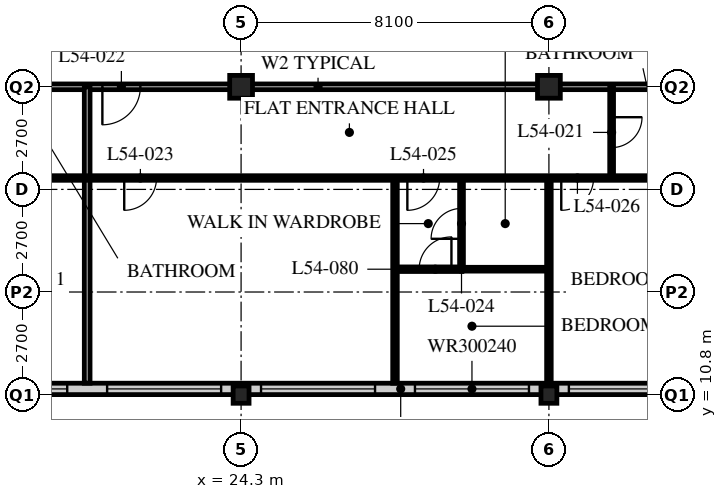
"""IFC4 building model, lengths in metres.
Left out: names, types, materials, properties, quantities, classifications, styles, units other than length and angle.
Written with IfcOpenShell. Run it as: python <this file> out.ifc"""

import sys

from ifc_helpers import new_model, si_unit, direction, frame, frame_2d, origin, origin_2d, place, context, subcontext, project, spatial, rectangle, hollow_rectangle, i_section, extrude, element, fill, save


model = new_model("IFC4")
c1 = context("Model", 3, precision=1e-05, world=origin(), true_north=direction((0.0, 1.0)))
c2 = subcontext(c1, "Body", "Model", "MODEL_VIEW")
j1 = project(units=[si_unit("LENGTHUNIT", "METRE"), si_unit("PLANEANGLEUNIT", "RADIAN")], contexts=[c1])
p1 = place(None, origin())
s1 = spatial("IfcSite", under=j1, at=p1, CompositionType="ELEMENT")
p2 = place(p1, origin())
s2 = spatial("IfcBuilding", under=s1, at=p2, CompositionType="ELEMENT")
p3 = place(p2, frame((0.0, 0.0, 210.0)))
s3 = spatial("IfcBuildingStorey", under=s2, at=p3, CompositionType="ELEMENT", Elevation=210.0)
p4 = place(p3, frame((24.3, 10.8, 0.0), z_axis=(0.0, 0.0, 1.0), x_axis=(1.0, 0.0, 0.0)))
e1 = element("IfcColumn", 1, at=p4, inside=s3, PredefinedType="COLUMN", context=c2, shape_type="SweptSolid", body=[
    extrude(i_section(OverallWidth=0.418, OverallDepth=0.456, WebThickness=0.042, FlangeThickness=0.067, FilletRadius=0.015, at=origin_2d()), origin(), (0.0, 0.0, 1.0), 3.6),
])
p5 = place(p3, frame((24.3, 18.9, 0.0), z_axis=(0.0, 0.0, 1.0), x_axis=(1.0, 0.0, 0.0)))
e2 = element("IfcColumn", 2, at=p5, inside=s3, PredefinedType="COLUMN", context=c2, shape_type="SweptSolid", body=[
    extrude(hollow_rectangle(XDim=0.6, YDim=0.6, WallThickness=0.05, at=origin_2d()), origin(), (0.0, 0.0, 1.0), 3.6),
])
p6 = place(p3, frame((32.4, 10.8, 0.0), z_axis=(0.0, 0.0, 1.0), x_axis=(1.0, 0.0, 0.0)))
e3 = element("IfcColumn", 3, at=p6, inside=s3, PredefinedType="COLUMN", context=c2, shape_type="SweptSolid", body=[
    extrude(i_section(OverallWidth=0.418, OverallDepth=0.456, WebThickness=0.042, FlangeThickness=0.067, FilletRadius=0.015, at=origin_2d()), origin(), (0.0, 0.0, 1.0), 3.6),
])
p7 = place(p3, frame((32.4, 18.9, 0.0), z_axis=(0.0, 0.0, 1.0), x_axis=(1.0, 0.0, 0.0)))
e4 = element("IfcColumn", 4, at=p7, inside=s3, PredefinedType="COLUMN", context=c2, shape_type="SweptSolid", body=[
    extrude(hollow_rectangle(XDim=0.6, YDim=0.6, WallThickness=0.05, at=origin_2d()), origin(), (0.0, 0.0, 1.0), 3.6),
])
p8 = place(p3, frame((8.4, 10.95, 0.0), z_axis=(0.0, 0.0, 1.0), x_axis=(1.0, 0.0, 0.0)))
e5 = element("IfcWall", 5, at=p8, inside=s3, PredefinedType="SOLIDWALL", context=c2, shape_type="SweptSolid", body=[
    extrude(rectangle(XDim=40.2, YDim=0.3, at=frame_2d((20.1, 0.0))), origin(), (0.0, 0.0, 1.0), 3.39),
])
p9 = place(p8, frame((0.225, 0.0, 0.6)))
e6 = element("IfcOpeningElement", 6, at=p9, cuts=e5, PredefinedType="OPENING", context=c2, shape_type="SweptSolid", body=[
    extrude(rectangle(XDim=3.0, YDim=2.4, at=frame_2d((1.5, 1.2))), frame((0.0, 0.16, 0.0), z_axis=(0.0, -1.0, 0.0), x_axis=(1.0, 0.0, 0.0)), (0.0, 0.0, 1.0), 0.32),
])
p10 = place(p8, frame((4.275, 0.0, 0.6)))
e7 = element("IfcOpeningElement", 7, at=p10, cuts=e5, PredefinedType="OPENING", context=c2, shape_type="SweptSolid", body=[
    extrude(rectangle(XDim=3.0, YDim=2.4, at=frame_2d((1.5, 1.2))), frame((0.0, 0.16, 0.0), z_axis=(0.0, -1.0, 0.0), x_axis=(1.0, 0.0, 0.0)), (0.0, 0.0, 1.0), 0.32),
])
p11 = place(p8, frame((8.325, 0.0, 0.6)))
e8 = element("IfcOpeningElement", 8, at=p11, cuts=e5, PredefinedType="OPENING", context=c2, shape_type="SweptSolid", body=[
    extrude(rectangle(XDim=3.0, YDim=2.4, at=frame_2d((1.5, 1.2))), frame((0.0, 0.16, 0.0), z_axis=(0.0, -1.0, 0.0), x_axis=(1.0, 0.0, 0.0)), (0.0, 0.0, 1.0), 0.32),
])
p12 = place(p8, frame((12.375, 0.0, 0.6)))
e9 = element("IfcOpeningElement", 9, at=p12, cuts=e5, PredefinedType="OPENING", context=c2, shape_type="SweptSolid", body=[
    extrude(rectangle(XDim=3.0, YDim=2.4, at=frame_2d((1.5, 1.2))), frame((0.0, 0.16, 0.0), z_axis=(0.0, -1.0, 0.0), x_axis=(1.0, 0.0, 0.0)), (0.0, 0.0, 1.0), 0.32),
])
p13 = place(p8, frame((16.425, 0.0, 0.6)))
e10 = element("IfcOpeningElement", 10, at=p13, cuts=e5, PredefinedType="OPENING", context=c2, shape_type="SweptSolid", body=[
    extrude(rectangle(XDim=3.0, YDim=2.4, at=frame_2d((1.5, 1.2))), frame((0.0, 0.16, 0.0), z_axis=(0.0, -1.0, 0.0), x_axis=(1.0, 0.0, 0.0)), (0.0, 0.0, 1.0), 0.32),
])
p14 = place(p8, frame((20.475, 0.0, 0.6)))
e11 = element("IfcOpeningElement", 11, at=p14, cuts=e5, PredefinedType="OPENING", context=c2, shape_type="SweptSolid", body=[
    extrude(rectangle(XDim=3.0, YDim=2.4, at=frame_2d((1.5, 1.2))), frame((0.0, 0.16, 0.0), z_axis=(0.0, -1.0, 0.0), x_axis=(1.0, 0.0, 0.0)), (0.0, 0.0, 1.0), 0.32),
])
p15 = place(p8, frame((24.525, 0.0, 0.6)))
e12 = element("IfcOpeningElement", 12, at=p15, cuts=e5, PredefinedType="OPENING", context=c2, shape_type="SweptSolid", body=[
    extrude(rectangle(XDim=3.0, YDim=2.4, at=frame_2d((1.5, 1.2))), frame((0.0, 0.16, 0.0), z_axis=(0.0, -1.0, 0.0), x_axis=(1.0, 0.0, 0.0)), (0.0, 0.0, 1.0), 0.32),
])
p16 = place(p8, frame((28.575, 0.0, 0.6)))
e13 = element("IfcOpeningElement", 13, at=p16, cuts=e5, PredefinedType="OPENING", context=c2, shape_type="SweptSolid", body=[
    extrude(rectangle(XDim=3.0, YDim=2.4, at=frame_2d((1.5, 1.2))), frame((0.0, 0.16, 0.0), z_axis=(0.0, -1.0, 0.0), x_axis=(1.0, 0.0, 0.0)), (0.0, 0.0, 1.0), 0.32),
])
p17 = place(p8, frame((32.625, 0.0, 0.6)))
e14 = element("IfcOpeningElement", 14, at=p17, cuts=e5, PredefinedType="OPENING", context=c2, shape_type="SweptSolid", body=[
    extrude(rectangle(XDim=3.0, YDim=2.4, at=frame_2d((1.5, 1.2))), frame((0.0, 0.16, 0.0), z_axis=(0.0, -1.0, 0.0), x_axis=(1.0, 0.0, 0.0)), (0.0, 0.0, 1.0), 0.32),
])
p18 = place(p8, frame((36.675, 0.0, 0.6)))
e15 = element("IfcOpeningElement", 15, at=p18, cuts=e5, PredefinedType="OPENING", context=c2, shape_type="SweptSolid", body=[
    extrude(rectangle(XDim=3.0, YDim=2.4, at=frame_2d((1.5, 1.2))), frame((0.0, 0.16, 0.0), z_axis=(0.0, -1.0, 0.0), x_axis=(1.0, 0.0, 0.0)), (0.0, 0.0, 1.0), 0.32),
])
p19 = place(p3, frame((8.1, 18.9, 0.0), z_axis=(0.0, 0.0, 1.0), x_axis=(1.0, 0.0, 0.0)))
e16 = element("IfcWall", 16, at=p19, inside=s3, PredefinedType="PARTITIONING", context=c2, shape_type="SweptSolid", body=[
    extrude(rectangle(XDim=36.45, YDim=0.15, at=frame_2d((18.225, 0.0))), origin(), (0.0, 0.0, 1.0), 2.778),
])
p20 = place(p19, frame((4.45, 0.0, 0.0)))
e17 = element("IfcOpeningElement", 17, at=p20, cuts=e16, PredefinedType="OPENING", context=c2, shape_type="SweptSolid", body=[
    extrude(rectangle(XDim=1.0, YDim=2.1, at=frame_2d((0.5, 1.05))), frame((0.0, 0.085, 0.0), z_axis=(0.0, -1.0, 0.0), x_axis=(1.0, 0.0, 0.0)), (0.0, 0.0, 1.0), 0.17),
])
p21 = place(p19, frame((12.55, 0.0, 0.0)))
e18 = element("IfcOpeningElement", 18, at=p21, cuts=e16, PredefinedType="OPENING", context=c2, shape_type="SweptSolid", body=[
    extrude(rectangle(XDim=1.0, YDim=2.1, at=frame_2d((0.5, 1.05))), frame((0.0, 0.085, 0.0), z_axis=(0.0, -1.0, 0.0), x_axis=(1.0, 0.0, 0.0)), (0.0, 0.0, 1.0), 0.17),
])
p22 = place(p19, frame((29.05, 0.0, 0.0)))
e19 = element("IfcOpeningElement", 19, at=p22, cuts=e16, PredefinedType="OPENING", context=c2, shape_type="SweptSolid", body=[
    extrude(rectangle(XDim=1.0, YDim=2.1, at=frame_2d((0.5, 1.05))), frame((0.0, 0.085, 0.0), z_axis=(0.0, -1.0, 0.0), x_axis=(1.0, 0.0, 0.0)), (0.0, 0.0, 1.0), 0.17),
])
p23 = place(p19, frame((2.625, 0.0, 0.0)))
e20 = element("IfcOpeningElement", 20, at=p23, cuts=e16, PredefinedType="OPENING", context=c2, shape_type="SweptSolid", body=[
    extrude(rectangle(XDim=1.0, YDim=2.1, at=frame_2d((0.5, 1.05))), frame((0.0, 0.085, 0.0), z_axis=(0.0, -1.0, 0.0), x_axis=(1.0, 0.0, 0.0)), (0.0, 0.0, 1.0), 0.17),
])
p24 = place(p19, frame((33.925, 0.0, 0.0)))
e21 = element("IfcOpeningElement", 21, at=p24, cuts=e16, PredefinedType="OPENING", context=c2, shape_type="SweptSolid", body=[
    extrude(rectangle(XDim=1.0, YDim=2.1, at=frame_2d((0.5, 1.05))), frame((0.0, 0.085, 0.0), z_axis=(0.0, -1.0, 0.0), x_axis=(1.0, 0.0, 0.0)), (0.0, 0.0, 1.0), 0.17),
])
p25 = place(p3, frame((20.25, 18.9, 0.0), z_axis=(0.0, 0.0, 1.0), x_axis=(0.0, -1.0, 0.0)))
e22 = element("IfcWall", 22, at=p25, inside=s3, PredefinedType="PARTITIONING", context=c2, shape_type="SweptSolid", body=[
    extrude(rectangle(XDim=7.8, YDim=0.15, at=frame_2d((3.9, 0.0))), origin(), (0.0, 0.0, 1.0), 3.39),
])
p26 = place(p3, frame((34.05, 18.9, 0.0), z_axis=(0.0, 0.0, 1.0), x_axis=(0.0, -1.0, 0.0)))
e23 = element("IfcWall", 23, at=p26, inside=s3, PredefinedType="PARTITIONING", context=c2, shape_type="SweptSolid", body=[
    extrude(rectangle(XDim=2.4, YDim=0.1, at=frame_2d((1.2, 0.0))), origin(), (0.0, 0.0, 1.0), 3.39),
])
p27 = place(p26, frame((0.8, 0.0, 0.0)))
e24 = element("IfcOpeningElement", 24, at=p27, cuts=e23, PredefinedType="OPENING", context=c2, shape_type="SweptSolid", body=[
    extrude(rectangle(XDim=0.8, YDim=2.1, at=frame_2d((0.4, 1.05))), frame((0.0, 0.06, 0.0), z_axis=(0.0, -1.0, 0.0), x_axis=(1.0, 0.0, 0.0)), (0.0, 0.0, 1.0), 0.12),
])
p28 = place(p3, frame((30.1, 16.5, 0.0), z_axis=(0.0, 0.0, 1.0), x_axis=(0.0, -1.0, 0.0)))
e25 = element("IfcWall", 25, at=p28, inside=s3, PredefinedType="PARTITIONING", context=c2, shape_type="SweptSolid", body=[
    extrude(rectangle(XDim=2.4, YDim=0.1, at=frame_2d((1.2, 0.0))), origin(), (0.0, 0.0, 1.0), 3.39),
])
p29 = place(p28, frame((0.8, 0.0, 0.0)))
e26 = element("IfcOpeningElement", 26, at=p29, cuts=e25, PredefinedType="OPENING", context=c2, shape_type="SweptSolid", body=[
    extrude(rectangle(XDim=0.8, YDim=2.1, at=frame_2d((0.4, 1.05))), frame((0.0, 0.06, 0.0), z_axis=(0.0, -1.0, 0.0), x_axis=(1.0, 0.0, 0.0)), (0.0, 0.0, 1.0), 0.12),
])
p30 = place(p3, frame((30.1, 14.1, 0.0), z_axis=(0.0, 0.0, 1.0), x_axis=(1.0, 0.0, 0.0)))
e27 = element("IfcWall", 27, at=p30, inside=s3, PredefinedType="PARTITIONING", context=c2, shape_type="SweptSolid", body=[
    extrude(rectangle(XDim=2.3, YDim=0.1, at=frame_2d((1.15, 0.0))), origin(), (0.0, 0.0, 1.0), 3.39),
])
p31 = place(p3, frame((28.35, 16.5, 0.0), z_axis=(0.0, 0.0, 1.0), x_axis=(0.0, -1.0, 0.0)))
e28 = element("IfcWall", 28, at=p31, inside=s3, PredefinedType="PARTITIONING", context=c2, shape_type="SweptSolid", body=[
    extrude(rectangle(XDim=5.4, YDim=0.12, at=frame_2d((2.7, 0.0))), origin(), (0.0, 0.0, 1.0), 3.39),
])
p32 = place(p3, frame((32.4, 16.5, 0.0), z_axis=(0.0, 0.0, 1.0), x_axis=(0.0, -1.0, 0.0)))
e29 = element("IfcWall", 29, at=p32, inside=s3, PredefinedType="PARTITIONING", context=c2, shape_type="SweptSolid", body=[
    extrude(rectangle(XDim=5.4, YDim=0.12, at=frame_2d((2.7, 0.0))), origin(), (0.0, 0.0, 1.0), 2.778),
])
p33 = place(p3, frame((8.1, 16.5, 0.0), z_axis=(0.0, 0.0, 1.0), x_axis=(1.0, 0.0, 0.0)))
e30 = element("IfcWall", 30, at=p33, inside=s3, PredefinedType="PARTITIONING", context=c2, shape_type="SweptSolid", body=[
    extrude(rectangle(XDim=28.35, YDim=0.12, at=frame_2d((14.175, 0.0))), origin(), (0.0, 0.0, 1.0), 3.39),
])
p34 = place(p33, frame((5.025, 0.0, 0.0)))
e31 = element("IfcOpeningElement", 31, at=p34, cuts=e30, PredefinedType="OPENING", context=c2, shape_type="SweptSolid", body=[
    extrude(rectangle(XDim=0.85, YDim=2.1, at=frame_2d((0.425, 1.05))), frame((0.0, 0.07, 0.0), z_axis=(0.0, -1.0, 0.0), x_axis=(1.0, 0.0, 0.0)), (0.0, 0.0, 1.0), 0.14),
])
p35 = place(p33, frame((8.425, 0.0, 0.0)))
e32 = element("IfcOpeningElement", 32, at=p35, cuts=e30, PredefinedType="OPENING", context=c2, shape_type="SweptSolid", body=[
    extrude(rectangle(XDim=0.85, YDim=2.1, at=frame_2d((0.425, 1.05))), frame((0.0, 0.07, 0.0), z_axis=(0.0, -1.0, 0.0), x_axis=(1.0, 0.0, 0.0)), (0.0, 0.0, 1.0), 0.14),
])
p36 = place(p33, frame((13.125, 0.0, 0.0)))
e33 = element("IfcOpeningElement", 33, at=p36, cuts=e30, PredefinedType="OPENING", context=c2, shape_type="SweptSolid", body=[
    extrude(rectangle(XDim=0.85, YDim=2.1, at=frame_2d((0.425, 1.05))), frame((0.0, 0.07, 0.0), z_axis=(0.0, -1.0, 0.0), x_axis=(1.0, 0.0, 0.0)), (0.0, 0.0, 1.0), 0.14),
])
p37 = place(p33, frame((20.575, 0.0, 0.0)))
e34 = element("IfcOpeningElement", 34, at=p37, cuts=e30, PredefinedType="OPENING", context=c2, shape_type="SweptSolid", body=[
    extrude(rectangle(XDim=0.85, YDim=2.1, at=frame_2d((0.425, 1.05))), frame((0.0, 0.07, 0.0), z_axis=(0.0, -1.0, 0.0), x_axis=(1.0, 0.0, 0.0)), (0.0, 0.0, 1.0), 0.14),
])
p38 = place(p33, frame((24.625, 0.0, 0.0)))
e35 = element("IfcOpeningElement", 35, at=p38, cuts=e30, PredefinedType="OPENING", context=c2, shape_type="SweptSolid", body=[
    extrude(rectangle(XDim=0.85, YDim=2.1, at=frame_2d((0.425, 1.05))), frame((0.0, 0.07, 0.0), z_axis=(0.0, -1.0, 0.0), x_axis=(1.0, 0.0, 0.0)), (0.0, 0.0, 1.0), 0.14),
])
p39 = place(p33, frame((2.725, 0.0, 0.0)))
e36 = element("IfcOpeningElement", 36, at=p39, cuts=e30, PredefinedType="OPENING", context=c2, shape_type="SweptSolid", body=[
    extrude(rectangle(XDim=0.85, YDim=2.1, at=frame_2d((0.425, 1.05))), frame((0.0, 0.07, 0.0), z_axis=(0.0, -1.0, 0.0), x_axis=(1.0, 0.0, 0.0)), (0.0, 0.0, 1.0), 0.14),
])
p40 = place(p3, frame((30.11, 14.1, 0.0), z_axis=(0.0, 0.0, 1.0), x_axis=(-1.0, 0.0, 0.0)))
e37 = element("IfcWall", 37, at=p40, inside=s3, PredefinedType="PARTITIONING", context=c2, shape_type="SweptSolid", body=[
    extrude(rectangle(XDim=1.76, YDim=0.12, at=frame_2d((0.88, 0.0))), origin(), (0.0, 0.0, 1.0), 3.39),
])
p41 = place(p40, frame((0.275, 0.0, 0.0)))
e38 = element("IfcOpeningElement", 38, at=p41, cuts=e37, PredefinedType="OPENING", context=c2, shape_type="SweptSolid", body=[
    extrude(rectangle(XDim=0.85, YDim=2.1, at=frame_2d((0.425, 1.05))), frame((0.0, 0.07, 0.0), z_axis=(0.0, -1.0, 0.0), x_axis=(1.0, 0.0, 0.0)), (0.0, 0.0, 1.0), 0.14),
])
p42 = place(p11, origin())
e39 = element("IfcWindow", 39, at=p42, inside=s3, PartitioningType="SINGLE_PANEL", PredefinedType="WINDOW", context=c2, shape_type="SweptSolid", body=[
    extrude(rectangle(XDim=3.0, YDim=2.4, at=frame_2d((1.5, 1.2))), frame((0.0, 0.03, 0.0), z_axis=(0.0, -1.0, 0.0), x_axis=(1.0, 0.0, 0.0)), (0.0, 0.0, 1.0), 0.06),
])
fill(e8, e39)
p43 = place(p12, origin())
e40 = element("IfcWindow", 40, at=p43, inside=s3, PartitioningType="SINGLE_PANEL", PredefinedType="WINDOW", context=c2, shape_type="SweptSolid", body=[
    extrude(rectangle(XDim=3.0, YDim=2.4, at=frame_2d((1.5, 1.2))), frame((0.0, 0.03, 0.0), z_axis=(0.0, -1.0, 0.0), x_axis=(1.0, 0.0, 0.0)), (0.0, 0.0, 1.0), 0.06),
])
fill(e9, e40)
p44 = place(p13, origin())
e41 = element("IfcWindow", 41, at=p44, inside=s3, PartitioningType="SINGLE_PANEL", PredefinedType="WINDOW", context=c2, shape_type="SweptSolid", body=[
    extrude(rectangle(XDim=3.0, YDim=2.4, at=frame_2d((1.5, 1.2))), frame((0.0, 0.03, 0.0), z_axis=(0.0, -1.0, 0.0), x_axis=(1.0, 0.0, 0.0)), (0.0, 0.0, 1.0), 0.06),
])
fill(e10, e41)
p45 = place(p14, origin())
e42 = element("IfcWindow", 42, at=p45, inside=s3, PartitioningType="SINGLE_PANEL", PredefinedType="WINDOW", context=c2, shape_type="SweptSolid", body=[
    extrude(rectangle(XDim=3.0, YDim=2.4, at=frame_2d((1.5, 1.2))), frame((0.0, 0.03, 0.0), z_axis=(0.0, -1.0, 0.0), x_axis=(1.0, 0.0, 0.0)), (0.0, 0.0, 1.0), 0.06),
])
fill(e11, e42)
p46 = place(p15, origin())
e43 = element("IfcWindow", 43, at=p46, inside=s3, PartitioningType="SINGLE_PANEL", PredefinedType="WINDOW", context=c2, shape_type="SweptSolid", body=[
    extrude(rectangle(XDim=3.0, YDim=2.4, at=frame_2d((1.5, 1.2))), frame((0.0, 0.03, 0.0), z_axis=(0.0, -1.0, 0.0), x_axis=(1.0, 0.0, 0.0)), (0.0, 0.0, 1.0), 0.06),
])
fill(e12, e43)
p47 = place(p27, origin())
e44 = element("IfcDoor", 44, at=p47, inside=s3, OperationType="SINGLE_SWING_LEFT", PredefinedType="DOOR", context=c2, shape_type="SweptSolid", body=[
    extrude(rectangle(XDim=0.8, YDim=2.1, at=frame_2d((0.4, 1.05))), frame((0.0, 0.025, 0.0), z_axis=(0.0, -1.0, 0.0), x_axis=(1.0, 0.0, 0.0)), (0.0, 0.0, 1.0), 0.05),
])
fill(e24, e44)
p48 = place(p21, origin())
e45 = element("IfcDoor", 45, at=p48, inside=s3, OperationType="SINGLE_SWING_RIGHT", PredefinedType="DOOR", context=c2, shape_type="SweptSolid", body=[
    extrude(rectangle(XDim=1.0, YDim=2.1, at=frame_2d((0.5, 1.05))), frame((0.0, 0.025, 0.0), z_axis=(0.0, -1.0, 0.0), x_axis=(1.0, 0.0, 0.0)), (0.0, 0.0, 1.0), 0.05),
])
fill(e18, e45)
p49 = place(p36, origin())
e46 = element("IfcDoor", 46, at=p49, inside=s3, OperationType="SINGLE_SWING_RIGHT", PredefinedType="DOOR", context=c2, shape_type="SweptSolid", body=[
    extrude(rectangle(XDim=0.85, YDim=2.1, at=frame_2d((0.425, 1.05))), frame((0.0, 0.025, 0.0), z_axis=(0.0, -1.0, 0.0), x_axis=(1.0, 0.0, 0.0)), (0.0, 0.0, 1.0), 0.05),
])
fill(e33, e46)
p50 = place(p29, origin())
e47 = element("IfcDoor", 47, at=p50, inside=s3, OperationType="SINGLE_SWING_LEFT", PredefinedType="DOOR", context=c2, shape_type="SweptSolid", body=[
    extrude(rectangle(XDim=0.8, YDim=2.1, at=frame_2d((0.4, 1.05))), frame((0.0, 0.025, 0.0), z_axis=(0.0, -1.0, 0.0), x_axis=(1.0, 0.0, 0.0)), (0.0, 0.0, 1.0), 0.05),
])
fill(e26, e47)
p51 = place(p37, origin())
e48 = element("IfcDoor", 48, at=p51, inside=s3, OperationType="SINGLE_SWING_RIGHT", PredefinedType="DOOR", context=c2, shape_type="SweptSolid", body=[
    extrude(rectangle(XDim=0.85, YDim=2.1, at=frame_2d((0.425, 1.05))), frame((0.0, 0.025, 0.0), z_axis=(0.0, -1.0, 0.0), x_axis=(1.0, 0.0, 0.0)), (0.0, 0.0, 1.0), 0.05),
])
fill(e34, e48)
p52 = place(p38, origin())
e49 = element("IfcDoor", 49, at=p52, inside=s3, OperationType="SINGLE_SWING_RIGHT", PredefinedType="DOOR", context=c2, shape_type="SweptSolid", body=[
    extrude(rectangle(XDim=0.85, YDim=2.1, at=frame_2d((0.425, 1.05))), frame((0.0, 0.025, 0.0), z_axis=(0.0, -1.0, 0.0), x_axis=(1.0, 0.0, 0.0)), (0.0, 0.0, 1.0), 0.05),
])
fill(e35, e49)
p53 = place(p41, origin())
e50 = element("IfcDoor", 50, at=p53, inside=s3, OperationType="SINGLE_SWING_RIGHT", PredefinedType="DOOR", context=c2, shape_type="SweptSolid", body=[
    extrude(rectangle(XDim=0.85, YDim=2.1, at=frame_2d((0.425, 1.05))), frame((0.0, 0.025, 0.0), z_axis=(0.0, -1.0, 0.0), x_axis=(1.0, 0.0, 0.0)), (0.0, 0.0, 1.0), 0.05),
])
fill(e38, e50)
save(model, sys.argv[1])
